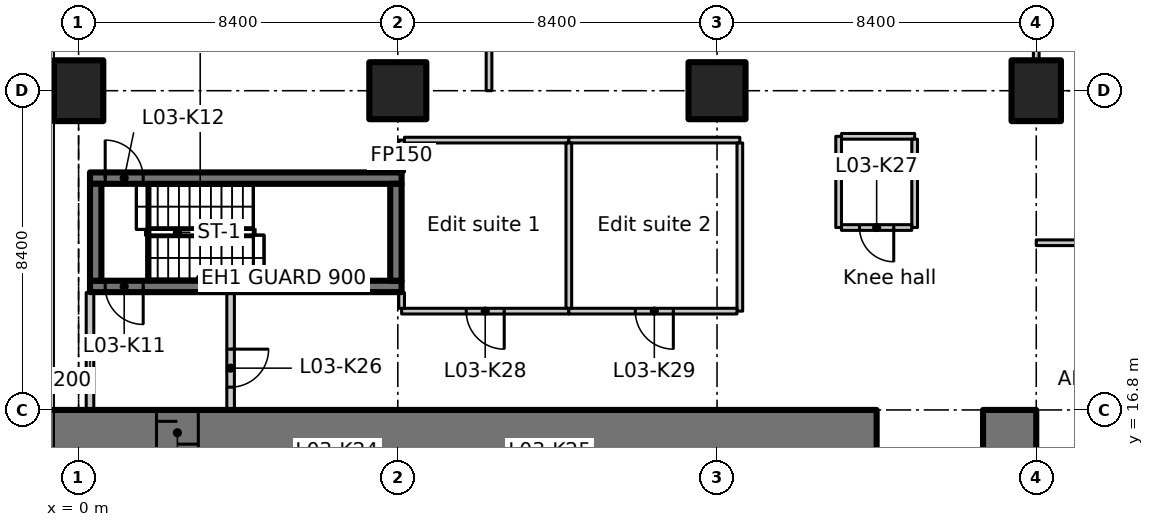
"""IFC4 building model, lengths in metres.
Left out: names, types, materials, properties, quantities, classifications, styles, units other than length and angle.
Written with IfcOpenShell. Run it as: python <this file> out.ifc"""

import sys

from ifc_helpers import new_model, si_unit, direction, frame, frame_2d, origin, origin_2d, place, context, subcontext, project, spatial, rectangle, extrude, element, fill, save


model = new_model("IFC4")
c1 = context("Model", 3, precision=1e-05, world=origin(), true_north=direction((0.0, 1.0)))
c2 = subcontext(c1, "Body", "Model", "MODEL_VIEW")
j1 = project(units=[si_unit("LENGTHUNIT", "METRE"), si_unit("PLANEANGLEUNIT", "RADIAN")], contexts=[c1])
p1 = place(None, origin())
s1 = spatial("IfcSite", under=j1, at=p1, CompositionType="ELEMENT")
p2 = place(p1, origin())
s2 = spatial("IfcBuilding", under=s1, at=p2, CompositionType="ELEMENT")
p3 = place(p2, frame((0.0, 0.0, 20.0)))
s3 = spatial("IfcBuildingStorey", under=s2, at=p3, CompositionType="ELEMENT", Elevation=20.0)
p4 = place(p3, frame((0.0, 25.2, 0.0), z_axis=(0.0, 0.0, 1.0), x_axis=(1.0, 0.0, 0.0)))
e1 = element("IfcColumn", 1, at=p4, inside=s3, PredefinedType="COLUMN", context=c2, shape_type="SweptSolid", body=[
    extrude(rectangle(XDim=1.3, YDim=1.6, at=origin_2d()), origin(), (0.0, 0.0, 1.0), 7.25),
])
for number, where, z_axis, x_axis in (
    (2, (8.4, 25.2, 0.0), (0.0, 0.0, 1.0), (1.0, 0.0, 0.0)),
    (3, (16.8, 25.2, 0.0), (0.0, 0.0, 1.0), (1.0, 0.0, 0.0)),
):
    element("IfcColumn", number, at=place(p3, frame(where, z_axis=z_axis, x_axis=x_axis)), inside=s3, PredefinedType="COLUMN", context=c2, shape_type="SweptSolid", body=[
        extrude(rectangle(XDim=1.5, YDim=1.5, at=origin_2d()), origin(), (0.0, 0.0, 1.0), 7.25),
    ])
p5 = place(p3, frame((25.2, 25.2, 0.0), z_axis=(0.0, 0.0, 1.0), x_axis=(1.0, 0.0, 0.0)))
e4 = element("IfcColumn", 4, at=p5, inside=s3, PredefinedType="COLUMN", context=c2, shape_type="SweptSolid", body=[
    extrude(rectangle(XDim=1.3, YDim=1.6, at=origin_2d()), origin(), (0.0, 0.0, 1.0), 7.25),
])
p6 = place(p3, frame((-1.1, 16.2, 0.0), z_axis=(0.0, 0.0, 1.0), x_axis=(1.0, 0.0, 0.0)))
e5 = element("IfcWall", 5, at=p6, inside=s3, PredefinedType="SHEAR", context=c2, shape_type="SweptSolid", body=[
    extrude(rectangle(XDim=22.1, YDim=1.2, at=frame_2d((11.05, 0.0))), origin(), (0.0, 0.0, 1.0), 7.25),
])
p7 = place(p6, frame((3.15, 0.0, 0.0)))
e6 = element("IfcOpeningElement", 6, at=p7, cuts=e5, PredefinedType="OPENING", context=c2, shape_type="SweptSolid", body=[
    extrude(rectangle(XDim=1.1, YDim=2.3, at=frame_2d((0.55, 1.15))), frame((0.0, 0.61, 0.0), z_axis=(0.0, -1.0, 0.0), x_axis=(1.0, 0.0, 0.0)), (0.0, 0.0, 1.0), 1.22),
])
p8 = place(p3, frame((23.8, 16.2, 0.0), z_axis=(0.0, 0.0, 1.0), x_axis=(1.0, 0.0, 0.0)))
e7 = element("IfcWall", 7, at=p8, inside=s3, PredefinedType="SHEAR", context=c2, shape_type="SweptSolid", body=[
    extrude(rectangle(XDim=1.4, YDim=1.2, at=frame_2d((0.7, 0.0))), origin(), (0.0, 0.0, 1.0), 7.25),
])
p9 = place(p3, frame((8.5, 20.05, 0.0), z_axis=(0.0, 0.0, 1.0), x_axis=(-1.0, 0.0, 0.0)))
e8 = element("IfcWall", 8, at=p9, inside=s3, PredefinedType="SHEAR", context=c2, shape_type="SweptSolid", body=[
    extrude(rectangle(XDim=8.2, YDim=0.3, at=frame_2d((4.1, 0.0))), origin(), (0.0, 0.0, 1.0), 7.25),
])
p10 = place(p9, frame((6.8, 0.0, 0.0)))
e9 = element("IfcOpeningElement", 9, at=p10, cuts=e8, PredefinedType="OPENING", context=c2, shape_type="SweptSolid", body=[
    extrude(rectangle(XDim=1.0, YDim=2.1, at=frame_2d((0.5, 1.05))), frame((0.0, 0.16, 0.0), z_axis=(0.0, -1.0, 0.0), x_axis=(1.0, 0.0, 0.0)), (0.0, 0.0, 1.0), 0.32),
])
p11 = place(p3, frame((0.3, 22.9, 0.0), z_axis=(0.0, 0.0, 1.0), x_axis=(1.0, 0.0, 0.0)))
e10 = element("IfcWall", 10, at=p11, inside=s3, PredefinedType="SHEAR", context=c2, shape_type="SweptSolid", body=[
    extrude(rectangle(XDim=8.2, YDim=0.3, at=frame_2d((4.1, 0.0))), origin(), (0.0, 0.0, 1.0), 7.25),
])
p12 = place(p11, frame((0.4, 0.0, 0.0)))
e11 = element("IfcOpeningElement", 11, at=p12, cuts=e10, PredefinedType="OPENING", context=c2, shape_type="SweptSolid", body=[
    extrude(rectangle(XDim=1.0, YDim=2.1, at=frame_2d((0.5, 1.05))), frame((0.0, 0.16, 0.0), z_axis=(0.0, -1.0, 0.0), x_axis=(1.0, 0.0, 0.0)), (0.0, 0.0, 1.0), 0.32),
])
for number, where, z_axis, x_axis in (
    (12, (0.45, 20.2, 0.0), (0.0, 0.0, 1.0), (0.0, 1.0, 0.0)),
    (13, (8.35, 20.2, 0.0), (0.0, 0.0, 1.0), (0.0, 1.0, 0.0)),
):
    element("IfcWall", number, at=place(p3, frame(where, z_axis=z_axis, x_axis=x_axis)), inside=s3, PredefinedType="SHEAR", context=c2, shape_type="SweptSolid", body=[
        extrude(rectangle(XDim=2.55, YDim=0.3, at=frame_2d((1.275, 0.0))), origin(), (0.0, 0.0, 1.0), 7.25),
    ])
p13 = place(p3, frame((0.3, 16.812, 0.0), z_axis=(0.0, 0.0, 1.0), x_axis=(0.0, 1.0, 0.0)))
e14 = element("IfcWall", 14, at=p13, inside=s3, PredefinedType="PARTITIONING", context=c2, shape_type="SweptSolid", body=[
    extrude(rectangle(XDim=3.076, YDim=0.2, at=frame_2d((1.538, 0.0))), origin(), (0.0, 0.0, 1.0), 6.88),
])
p14 = place(p3, frame((4.0, 19.888, 0.0), z_axis=(0.0, 0.0, 1.0), x_axis=(0.0, -1.0, 0.0)))
e15 = element("IfcWall", 15, at=p14, inside=s3, PredefinedType="PARTITIONING", context=c2, shape_type="SweptSolid", body=[
    extrude(rectangle(XDim=3.076, YDim=0.2, at=frame_2d((1.538, 0.0))), origin(), (0.0, 0.0, 1.0), 7.25),
])
p15 = place(p14, frame((1.488, 0.0, 0.0)))
e16 = element("IfcOpeningElement", 16, at=p15, cuts=e15, PredefinedType="OPENING", context=c2, shape_type="SweptSolid", body=[
    extrude(rectangle(XDim=1.0, YDim=2.1, at=frame_2d((0.5, 1.05))), frame((0.0, 0.11, 0.0), z_axis=(0.0, -1.0, 0.0), x_axis=(1.0, 0.0, 0.0)), (0.0, 0.0, 1.0), 0.22),
])
p16 = place(p3, frame((12.9, 19.4, 0.0), z_axis=(0.0, 0.0, 1.0), x_axis=(-1.0, 0.0, 0.0)))
e17 = element("IfcWall", 17, at=p16, inside=s3, PredefinedType="PARTITIONING", context=c2, shape_type="SweptSolid", body=[
    extrude(rectangle(XDim=4.4, YDim=0.15, at=frame_2d((2.2, 0.0))), origin(), (0.0, 0.0, 1.0), 7.25),
])
p17 = place(p16, frame((1.7, 0.0, 0.0)))
e18 = element("IfcOpeningElement", 18, at=p17, cuts=e17, PredefinedType="OPENING", context=c2, shape_type="SweptSolid", body=[
    extrude(rectangle(XDim=1.0, YDim=2.1, at=frame_2d((0.5, 1.05))), frame((0.0, 0.085, 0.0), z_axis=(0.0, -1.0, 0.0), x_axis=(1.0, 0.0, 0.0)), (0.0, 0.0, 1.0), 0.17),
])
p18 = place(p3, frame((8.5, 19.475, 0.0), z_axis=(0.0, 0.0, 1.0), x_axis=(0.0, 1.0, 0.0)))
e19 = element("IfcWall", 19, at=p18, inside=s3, PredefinedType="PARTITIONING", context=c2, shape_type="SweptSolid", body=[
    extrude(rectangle(XDim=0.413, YDim=0.15, at=frame_2d((0.207, 0.0))), origin(), (0.0, 0.0, 1.0), 7.25),
])
p19 = place(p3, frame((8.5, 23.062, 0.0), z_axis=(0.0, 0.0, 1.0), x_axis=(0.0, 1.0, 0.0)))
e20 = element("IfcWall", 20, at=p19, inside=s3, PredefinedType="PARTITIONING", context=c2, shape_type="SweptSolid", body=[
    extrude(rectangle(XDim=0.838, YDim=0.15, at=frame_2d((0.419, 0.0))), origin(), (0.0, 0.0, 1.0), 7.25),
])
p20 = place(p3, frame((8.575, 23.9, 0.0), z_axis=(0.0, 0.0, 1.0), x_axis=(1.0, 0.0, 0.0)))
e21 = element("IfcWall", 21, at=p20, inside=s3, PredefinedType="PARTITIONING", context=c2, shape_type="SweptSolid", body=[
    extrude(rectangle(XDim=4.325, YDim=0.15, at=frame_2d((2.163, 0.0))), origin(), (0.0, 0.0, 1.0), 7.25),
])
p21 = place(p3, frame((12.9, 23.9, 0.0), z_axis=(0.0, 0.0, 1.0), x_axis=(1.0, 0.0, 0.0)))
e22 = element("IfcWall", 22, at=p21, inside=s3, PredefinedType="PARTITIONING", context=c2, shape_type="SweptSolid", body=[
    extrude(rectangle(XDim=4.5, YDim=0.15, at=frame_2d((2.25, 0.0))), origin(), (0.0, 0.0, 1.0), 7.25),
])
p22 = place(p3, frame((17.4, 23.825, 0.0), z_axis=(0.0, 0.0, 1.0), x_axis=(0.0, -1.0, 0.0)))
e23 = element("IfcWall", 23, at=p22, inside=s3, PredefinedType="PARTITIONING", context=c2, shape_type="SweptSolid", body=[
    extrude(rectangle(XDim=4.425, YDim=0.15, at=frame_2d((2.212, 0.0))), origin(), (0.0, 0.0, 1.0), 7.25),
])
p23 = place(p3, frame((17.325, 19.4, 0.0), z_axis=(0.0, 0.0, 1.0), x_axis=(-1.0, 0.0, 0.0)))
e24 = element("IfcWall", 24, at=p23, inside=s3, PredefinedType="PARTITIONING", context=c2, shape_type="SweptSolid", body=[
    extrude(rectangle(XDim=4.425, YDim=0.15, at=frame_2d((2.212, 0.0))), origin(), (0.0, 0.0, 1.0), 7.25),
])
p24 = place(p23, frame((1.675, 0.0, 0.0)))
e25 = element("IfcOpeningElement", 25, at=p24, cuts=e24, PredefinedType="OPENING", context=c2, shape_type="SweptSolid", body=[
    extrude(rectangle(XDim=1.0, YDim=2.1, at=frame_2d((0.5, 1.05))), frame((0.0, 0.085, 0.0), z_axis=(0.0, -1.0, 0.0), x_axis=(1.0, 0.0, 0.0)), (0.0, 0.0, 1.0), 0.17),
])
p25 = place(p3, frame((12.9, 23.825, 0.0), z_axis=(0.0, 0.0, 1.0), x_axis=(0.0, -1.0, 0.0)))
e26 = element("IfcWall", 26, at=p25, inside=s3, PredefinedType="PARTITIONING", context=c2, shape_type="SweptSolid", body=[
    extrude(rectangle(XDim=4.35, YDim=0.15, at=frame_2d((2.175, 0.0))), origin(), (0.0, 0.0, 1.0), 7.25),
])
p26 = place(p3, frame((20.0, 21.6, 0.0), z_axis=(0.0, 0.0, 1.0), x_axis=(0.0, 1.0, 0.0)))
e27 = element("IfcWall", 27, at=p26, inside=s3, PredefinedType="PARTITIONING", context=c2, shape_type="SweptSolid", body=[
    extrude(rectangle(XDim=2.4, YDim=0.15, at=frame_2d((1.2, 0.0))), origin(), (0.0, 0.0, 1.0), 7.25),
])
p27 = place(p3, frame((20.075, 24.0, 0.0), z_axis=(0.0, 0.0, 1.0), x_axis=(1.0, 0.0, 0.0)))
e28 = element("IfcWall", 28, at=p27, inside=s3, PredefinedType="PARTITIONING", context=c2, shape_type="SweptSolid", body=[
    extrude(rectangle(XDim=1.925, YDim=0.15, at=frame_2d((0.962, 0.0))), origin(), (0.0, 0.0, 1.0), 7.25),
])
p28 = place(p3, frame((22.0, 23.925, 0.0), z_axis=(0.0, 0.0, 1.0), x_axis=(0.0, -1.0, 0.0)))
e29 = element("IfcWall", 29, at=p28, inside=s3, PredefinedType="PARTITIONING", context=c2, shape_type="SweptSolid", body=[
    extrude(rectangle(XDim=2.325, YDim=0.15, at=frame_2d((1.163, 0.0))), origin(), (0.0, 0.0, 1.0), 7.25),
])
p29 = place(p3, frame((21.925, 21.6, 0.0), z_axis=(0.0, 0.0, 1.0), x_axis=(-1.0, 0.0, 0.0)))
e30 = element("IfcWall", 30, at=p29, inside=s3, PredefinedType="PARTITIONING", context=c2, shape_type="SweptSolid", body=[
    extrude(rectangle(XDim=1.85, YDim=0.15, at=frame_2d((0.925, 0.0))), origin(), (0.0, 0.0, 1.0), 7.25),
])
p30 = place(p29, frame((0.475, 0.0, 0.0)))
e31 = element("IfcOpeningElement", 31, at=p30, cuts=e30, PredefinedType="OPENING", context=c2, shape_type="SweptSolid", body=[
    extrude(rectangle(XDim=0.9, YDim=2.1, at=frame_2d((0.45, 1.05))), frame((0.0, 0.085, 0.0), z_axis=(0.0, -1.0, 0.0), x_axis=(1.0, 0.0, 0.0)), (0.0, 0.0, 1.0), 0.17),
])
p31 = place(p3, frame((25.2, 21.2, 0.0), z_axis=(0.0, 0.0, 1.0), x_axis=(1.0, 0.0, 0.0)))
e32 = element("IfcWall", 32, at=p31, inside=s3, PredefinedType="PARTITIONING", context=c2, shape_type="SweptSolid", body=[
    extrude(rectangle(XDim=4.2, YDim=0.15, at=frame_2d((2.1, 0.0))), origin(), (0.0, 0.0, 1.0), 7.23),
])
p32 = place(p3, frame((25.2, 31.0, 0.0), z_axis=(0.0, 0.0, 1.0), x_axis=(0.0, -1.0, 0.0)))
e33 = element("IfcWall", 33, at=p32, inside=s3, PredefinedType="PARTITIONING", context=c2, shape_type="SweptSolid", body=[
    extrude(rectangle(XDim=4.98, YDim=0.15, at=frame_2d((2.49, 0.0))), origin(), (0.0, 0.0, 1.0), 7.23),
])
p33 = place(p32, frame((2.08, 0.0, 0.0)))
e34 = element("IfcOpeningElement", 34, at=p33, cuts=e33, PredefinedType="OPENING", context=c2, shape_type="SweptSolid", body=[
    extrude(rectangle(XDim=1.1, YDim=2.1, at=frame_2d((0.55, 1.05))), frame((0.0, 0.085, 0.0), z_axis=(0.0, -1.0, 0.0), x_axis=(1.0, 0.0, 0.0)), (0.0, 0.0, 1.0), 0.17),
])
p34 = place(p3, frame((10.8, 25.2, 0.0), z_axis=(0.0, 0.0, 1.0), x_axis=(0.0, 1.0, 0.0)))
e35 = element("IfcWall", 35, at=p34, inside=s3, PredefinedType="PARTITIONING", context=c2, shape_type="SweptSolid", body=[
    extrude(rectangle(XDim=6.0, YDim=0.15, at=frame_2d((3.0, 0.0))), origin(), (0.0, 0.0, 1.0), 7.23),
])
p35 = place(p34, frame((2.1, 0.0, 0.0)))
e36 = element("IfcOpeningElement", 36, at=p35, cuts=e35, PredefinedType="OPENING", context=c2, shape_type="SweptSolid", body=[
    extrude(rectangle(XDim=1.6, YDim=2.1, at=frame_2d((0.8, 1.05))), frame((0.0, 0.085, 0.0), z_axis=(0.0, -1.0, 0.0), x_axis=(1.0, 0.0, 0.0)), (0.0, 0.0, 1.0), 0.17),
])
p36 = place(p7, origin())
e37 = element("IfcDoor", 37, at=p36, inside=s3, OperationType="SLIDING_TO_LEFT", PredefinedType="DOOR", context=c2, shape_type="SweptSolid", body=[
    extrude(rectangle(XDim=1.1, YDim=2.3, at=frame_2d((0.55, 1.15))), frame((0.0, 0.025, 0.0), z_axis=(0.0, -1.0, 0.0), x_axis=(1.0, 0.0, 0.0)), (0.0, 0.0, 1.0), 0.05),
])
fill(e6, e37)
p37 = place(p10, origin())
e38 = element("IfcDoor", 38, at=p37, inside=s3, OperationType="SINGLE_SWING_RIGHT", PredefinedType="DOOR", context=c2, shape_type="SweptSolid", body=[
    extrude(rectangle(XDim=1.0, YDim=2.1, at=frame_2d((0.5, 1.05))), frame((0.0, 0.025, 0.0), z_axis=(0.0, -1.0, 0.0), x_axis=(1.0, 0.0, 0.0)), (0.0, 0.0, 1.0), 0.05),
])
fill(e9, e38)
p38 = place(p12, origin())
e39 = element("IfcDoor", 39, at=p38, inside=s3, OperationType="SINGLE_SWING_LEFT", PredefinedType="DOOR", context=c2, shape_type="SweptSolid", body=[
    extrude(rectangle(XDim=1.0, YDim=2.1, at=frame_2d((0.5, 1.05))), frame((0.0, 0.025, 0.0), z_axis=(0.0, -1.0, 0.0), x_axis=(1.0, 0.0, 0.0)), (0.0, 0.0, 1.0), 0.05),
])
fill(e11, e39)
p39 = place(p15, origin())
e40 = element("IfcDoor", 40, at=p39, inside=s3, OperationType="SINGLE_SWING_LEFT", PredefinedType="DOOR", context=c2, shape_type="SweptSolid", body=[
    extrude(rectangle(XDim=1.0, YDim=2.1, at=frame_2d((0.5, 1.05))), frame((0.0, 0.025, 0.0), z_axis=(0.0, -1.0, 0.0), x_axis=(1.0, 0.0, 0.0)), (0.0, 0.0, 1.0), 0.05),
])
fill(e16, e40)
p40 = place(p30, origin())
e41 = element("IfcDoor", 41, at=p40, inside=s3, OperationType="SINGLE_SWING_RIGHT", PredefinedType="DOOR", context=c2, shape_type="SweptSolid", body=[
    extrude(rectangle(XDim=0.9, YDim=2.1, at=frame_2d((0.45, 1.05))), frame((0.0, 0.025, 0.0), z_axis=(0.0, -1.0, 0.0), x_axis=(1.0, 0.0, 0.0)), (0.0, 0.0, 1.0), 0.05),
])
fill(e31, e41)
p41 = place(p17, origin())
e42 = element("IfcDoor", 42, at=p41, inside=s3, OperationType="SINGLE_SWING_LEFT", PredefinedType="DOOR", context=c2, shape_type="SweptSolid", body=[
    extrude(rectangle(XDim=1.0, YDim=2.1, at=frame_2d((0.5, 1.05))), frame((0.0, 0.025, 0.0), z_axis=(0.0, -1.0, 0.0), x_axis=(1.0, 0.0, 0.0)), (0.0, 0.0, 1.0), 0.05),
])
fill(e18, e42)
p42 = place(p24, origin())
e43 = element("IfcDoor", 43, at=p42, inside=s3, OperationType="SINGLE_SWING_RIGHT", PredefinedType="DOOR", context=c2, shape_type="SweptSolid", body=[
    extrude(rectangle(XDim=1.0, YDim=2.1, at=frame_2d((0.5, 1.05))), frame((0.0, 0.025, 0.0), z_axis=(0.0, -1.0, 0.0), x_axis=(1.0, 0.0, 0.0)), (0.0, 0.0, 1.0), 0.05),
])
fill(e25, e43)
save(model, sys.argv[1])
